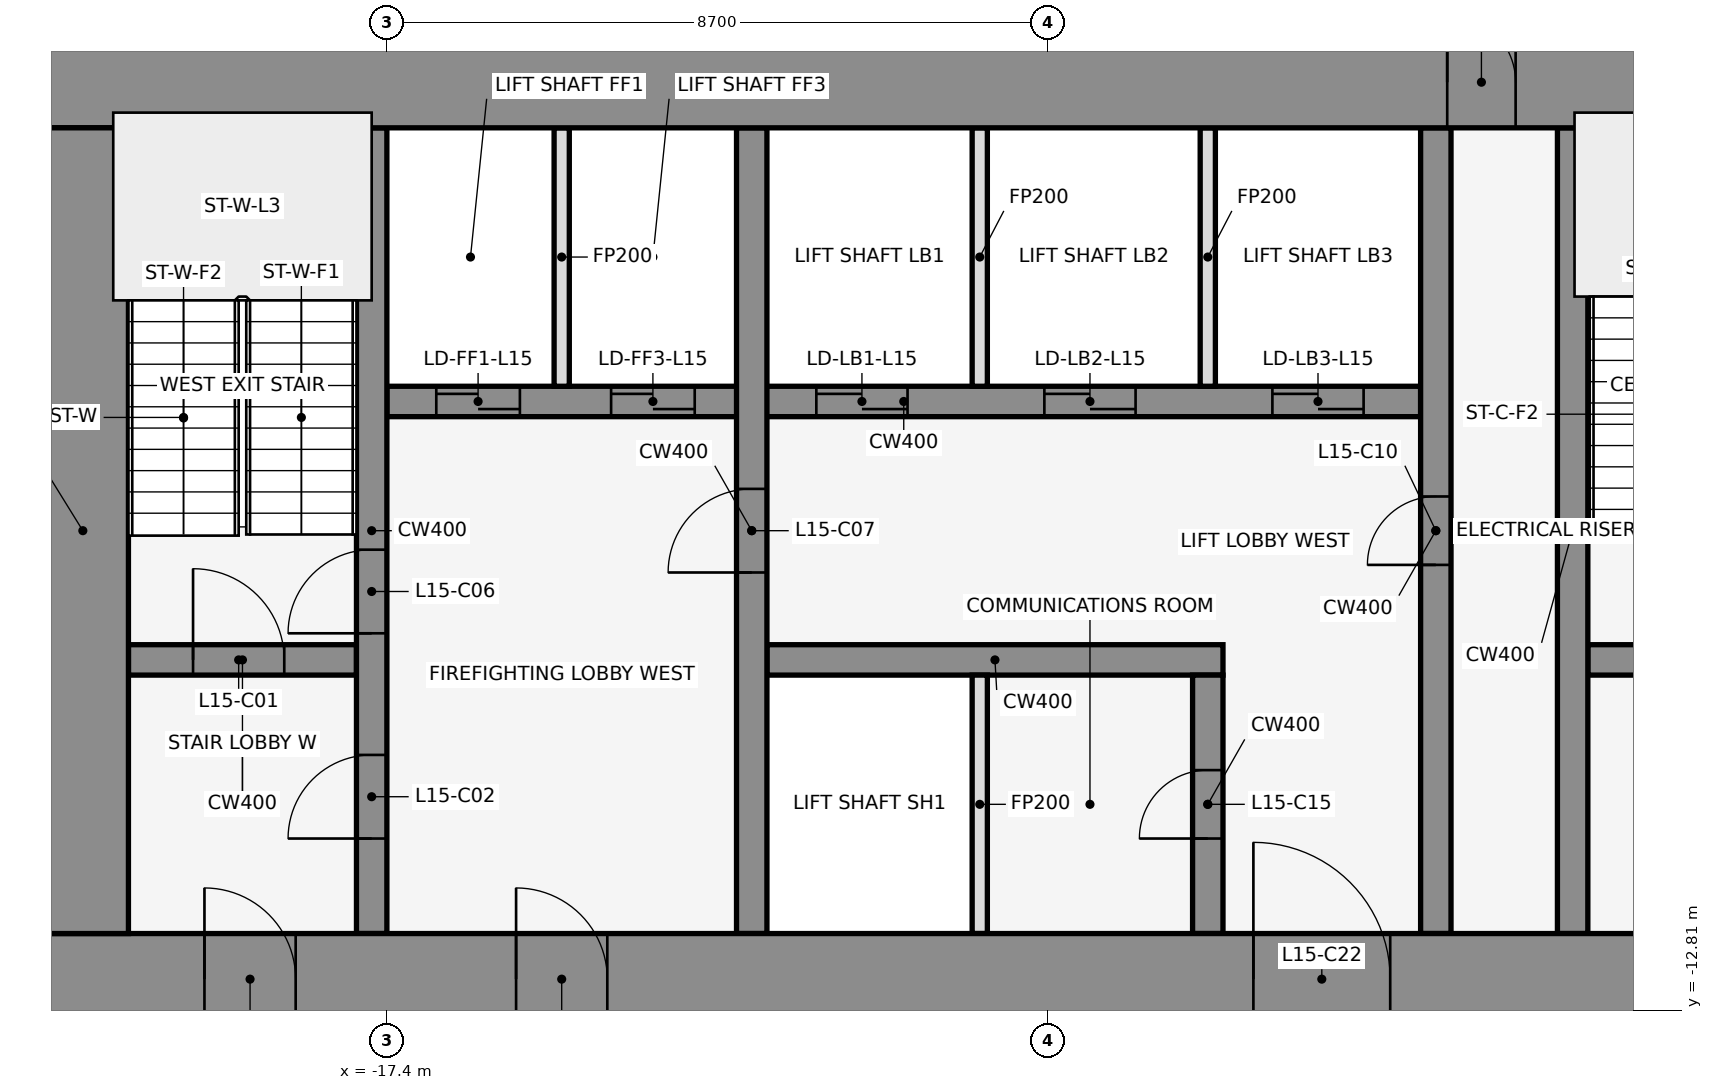
"""IFC4 building model, lengths in metres.
Left out: names, types, materials, properties, quantities, classifications, styles, units other than length and angle.
Written with IfcOpenShell. Run it as: python <this file> out.ifc"""

import sys

from ifc_helpers import new_model, si_unit, direction, frame, frame_2d, origin, place, context, subcontext, project, spatial, rectangle, extrude, element, fill, save


model = new_model("IFC4")
c1 = context("Model", 3, precision=1e-05, world=origin(), true_north=direction((0.0, 1.0)))
c2 = subcontext(c1, "Body", "Model", "MODEL_VIEW")
j1 = project(units=[si_unit("LENGTHUNIT", "METRE"), si_unit("PLANEANGLEUNIT", "RADIAN")], contexts=[c1])
p1 = place(None, origin())
s1 = spatial("IfcSite", under=j1, at=p1, CompositionType="ELEMENT")
p2 = place(p1, origin())
s2 = spatial("IfcBuilding", under=s1, at=p2, CompositionType="ELEMENT")
p3 = place(p2, frame((0.0, 0.0, 75.5)))
s3 = spatial("IfcBuildingStorey", under=s2, at=p3, CompositionType="ELEMENT", Elevation=75.5)
for number, where, z_axis, x_axis in (
    (1, (-0.068, -0.105, 0.0), (0.0, 0.0, 1.0), (-0.84, 0.543, 0.0)),
    (2, (-14.599, 1.08, 0.0), (0.0, 0.0, 1.0), (-0.84, -0.543, 0.0)),
):
    element("IfcWall", number, at=place(p3, frame(where, z_axis=z_axis, x_axis=x_axis)), inside=s3, PredefinedType="STANDARD", context=c2, shape_type="SweptSolid", body=[
        extrude(rectangle(XDim=2.183, YDim=0.25, at=frame_2d((1.091, 0.0))), origin(), (0.0, 0.0, 1.0), 4.35),
    ])
p4 = place(p3, frame((-20.8, -8.2, 0.0), z_axis=(0.0, 0.0, 1.0), x_axis=(1.0, 0.0, 0.0)))
e3 = element("IfcWall", 3, at=p4, inside=s3, PredefinedType="SHEAR", context=c2, shape_type="SweptSolid", body=[
    extrude(rectangle(XDim=3.0, YDim=0.4, at=frame_2d((1.5, 0.0))), origin(), (0.0, 0.0, 1.0), 4.5),
])
p5 = place(p4, frame((0.85, 0.0, 0.0)))
e4 = element("IfcOpeningElement", 4, at=p5, cuts=e3, PredefinedType="OPENING", context=c2, shape_type="SweptSolid", body=[
    extrude(rectangle(XDim=1.2, YDim=2.1, at=frame_2d((0.6, 1.05))), frame((0.0, 0.212, 0.0), z_axis=(0.0, -1.0, 0.0), x_axis=(1.0, 0.0, 0.0)), (0.0, 0.0, 1.0), 0.424),
])
p6 = place(p3, frame((-12.4, -8.2, 0.0), z_axis=(0.0, 0.0, 1.0), x_axis=(1.0, 0.0, 0.0)))
e5 = element("IfcWall", 5, at=p6, inside=s3, PredefinedType="SHEAR", context=c2, shape_type="SweptSolid", body=[
    extrude(rectangle(XDim=6.0, YDim=0.4, at=frame_2d((3.0, 0.0))), origin(), (0.0, 0.0, 1.0), 4.5),
])
p7 = place(p3, frame((-1.6, -8.2, 0.0), z_axis=(0.0, 0.0, 1.0), x_axis=(1.0, 0.0, 0.0)))
e6 = element("IfcWall", 6, at=p7, inside=s3, PredefinedType="SHEAR", context=c2, shape_type="SweptSolid", body=[
    extrude(rectangle(XDim=3.2, YDim=0.4, at=frame_2d((1.6, 0.0))), origin(), (0.0, 0.0, 1.0), 4.5),
])
p8 = place(p7, frame((1.05, 0.0, 0.0)))
e7 = element("IfcOpeningElement", 7, at=p8, cuts=e6, PredefinedType="OPENING", context=c2, shape_type="SweptSolid", body=[
    extrude(rectangle(XDim=1.2, YDim=2.1, at=frame_2d((0.6, 1.05))), frame((0.0, 0.212, 0.0), z_axis=(0.0, -1.0, 0.0), x_axis=(1.0, 0.0, 0.0)), (0.0, 0.0, 1.0), 0.424),
])
p9 = place(p3, frame((-17.4, -4.8, 0.0), z_axis=(0.0, 0.0, 1.0), x_axis=(1.0, 0.0, 0.0)))
e8 = element("IfcWall", 8, at=p9, inside=s3, PredefinedType="SHEAR", context=c2, shape_type="SweptSolid", body=[
    extrude(rectangle(XDim=13.6, YDim=0.4, at=frame_2d((6.8, 0.0))), origin(), (0.0, 0.0, 1.0), 4.5),
])
p10 = place(p9, frame((0.65, 0.0, 0.0)))
e9 = element("IfcOpeningElement", 9, at=p10, cuts=e8, PredefinedType="OPENING", context=c2, shape_type="SweptSolid", body=[
    extrude(rectangle(XDim=1.1, YDim=2.1, at=frame_2d((0.55, 1.05))), frame((0.0, 0.212, 0.0), z_axis=(0.0, -1.0, 0.0), x_axis=(1.0, 0.0, 0.0)), (0.0, 0.0, 1.0), 0.424),
])
p11 = place(p9, frame((2.95, 0.0, 0.0)))
e10 = element("IfcOpeningElement", 10, at=p11, cuts=e8, PredefinedType="OPENING", context=c2, shape_type="SweptSolid", body=[
    extrude(rectangle(XDim=1.1, YDim=2.1, at=frame_2d((0.55, 1.05))), frame((0.0, 0.212, 0.0), z_axis=(0.0, -1.0, 0.0), x_axis=(1.0, 0.0, 0.0)), (0.0, 0.0, 1.0), 0.424),
])
p12 = place(p9, frame((5.65, 0.0, 0.0)))
e11 = element("IfcOpeningElement", 11, at=p12, cuts=e8, PredefinedType="OPENING", context=c2, shape_type="SweptSolid", body=[
    extrude(rectangle(XDim=1.2, YDim=2.1, at=frame_2d((0.6, 1.05))), frame((0.0, 0.212, 0.0), z_axis=(0.0, -1.0, 0.0), x_axis=(1.0, 0.0, 0.0)), (0.0, 0.0, 1.0), 0.424),
])
p13 = place(p9, frame((8.65, 0.0, 0.0)))
e12 = element("IfcOpeningElement", 12, at=p13, cuts=e8, PredefinedType="OPENING", context=c2, shape_type="SweptSolid", body=[
    extrude(rectangle(XDim=1.2, YDim=2.1, at=frame_2d((0.6, 1.05))), frame((0.0, 0.212, 0.0), z_axis=(0.0, -1.0, 0.0), x_axis=(1.0, 0.0, 0.0)), (0.0, 0.0, 1.0), 0.424),
])
p14 = place(p9, frame((11.65, 0.0, 0.0)))
e13 = element("IfcOpeningElement", 13, at=p14, cuts=e8, PredefinedType="OPENING", context=c2, shape_type="SweptSolid", body=[
    extrude(rectangle(XDim=1.2, YDim=2.1, at=frame_2d((0.6, 1.05))), frame((0.0, 0.212, 0.0), z_axis=(0.0, -1.0, 0.0), x_axis=(1.0, 0.0, 0.0)), (0.0, 0.0, 1.0), 0.424),
])
p15 = place(p3, frame((-17.6, -11.8, 0.0), z_axis=(0.0, 0.0, 1.0), x_axis=(0.0, 1.0, 0.0)))
e14 = element("IfcWall", 14, at=p15, inside=s3, PredefinedType="SHEAR", context=c2, shape_type="SweptSolid", body=[
    extrude(rectangle(XDim=10.6, YDim=0.4, at=frame_2d((5.3, 0.0))), origin(), (0.0, 0.0, 1.0), 4.5),
])
p16 = place(p15, frame((1.25, 0.0, 0.0)))
e15 = element("IfcOpeningElement", 15, at=p16, cuts=e14, PredefinedType="OPENING", context=c2, shape_type="SweptSolid", body=[
    extrude(rectangle(XDim=1.1, YDim=2.1, at=frame_2d((0.55, 1.05))), frame((0.0, 0.212, 0.0), z_axis=(0.0, -1.0, 0.0), x_axis=(1.0, 0.0, 0.0)), (0.0, 0.0, 1.0), 0.424),
])
p17 = place(p15, frame((3.95, 0.0, 0.0)))
e16 = element("IfcOpeningElement", 16, at=p17, cuts=e14, PredefinedType="OPENING", context=c2, shape_type="SweptSolid", body=[
    extrude(rectangle(XDim=1.1, YDim=2.1, at=frame_2d((0.55, 1.05))), frame((0.0, 0.212, 0.0), z_axis=(0.0, -1.0, 0.0), x_axis=(1.0, 0.0, 0.0)), (0.0, 0.0, 1.0), 0.424),
])
p18 = place(p3, frame((-15.1, -4.6, 0.0), z_axis=(0.0, 0.0, 1.0), x_axis=(0.0, 1.0, 0.0)))
e17 = element("IfcWall", 17, at=p18, inside=s3, PredefinedType="PARTITIONING", context=c2, shape_type="SweptSolid", body=[
    extrude(rectangle(XDim=3.4, YDim=0.2, at=frame_2d((1.7, 0.0))), origin(), (0.0, 0.0, 1.0), 3.339),
])
p19 = place(p3, frame((-12.6, -11.8, 0.0), z_axis=(0.0, 0.0, 1.0), x_axis=(0.0, 1.0, 0.0)))
e18 = element("IfcWall", 18, at=p19, inside=s3, PredefinedType="SHEAR", context=c2, shape_type="SweptSolid", body=[
    extrude(rectangle(XDim=10.6, YDim=0.4, at=frame_2d((5.3, 0.0))), origin(), (0.0, 0.0, 1.0), 4.5),
])
p20 = place(p19, frame((4.75, 0.0, 0.0)))
e19 = element("IfcOpeningElement", 19, at=p20, cuts=e18, PredefinedType="OPENING", context=c2, shape_type="SweptSolid", body=[
    extrude(rectangle(XDim=1.1, YDim=2.1, at=frame_2d((0.55, 1.05))), frame((0.0, 0.212, 0.0), z_axis=(0.0, -1.0, 0.0), x_axis=(1.0, 0.0, 0.0)), (0.0, 0.0, 1.0), 0.424),
])
for number, where, z_axis, x_axis in (
    (20, (-9.6, -11.8, 0.0), (0.0, 0.0, 1.0), (0.0, 1.0, 0.0)),
    (21, (-9.6, -4.6, 0.0), (0.0, 0.0, 1.0), (0.0, 1.0, 0.0)),
):
    element("IfcWall", number, at=place(p3, frame(where, z_axis=z_axis, x_axis=x_axis)), inside=s3, PredefinedType="PARTITIONING", context=c2, shape_type="SweptSolid", body=[
        extrude(rectangle(XDim=3.4, YDim=0.2, at=frame_2d((1.7, 0.0))), origin(), (0.0, 0.0, 1.0), 3.339),
    ])
p21 = place(p3, frame((-6.6, -11.8, 0.0), z_axis=(0.0, 0.0, 1.0), x_axis=(0.0, 1.0, 0.0)))
e22 = element("IfcWall", 22, at=p21, inside=s3, PredefinedType="SHEAR", context=c2, shape_type="SweptSolid", body=[
    extrude(rectangle(XDim=3.4, YDim=0.4, at=frame_2d((1.7, 0.0))), origin(), (0.0, 0.0, 1.0), 4.5),
])
p22 = place(p21, frame((1.25, 0.0, 0.0)))
e23 = element("IfcOpeningElement", 23, at=p22, cuts=e22, PredefinedType="OPENING", context=c2, shape_type="SweptSolid", body=[
    extrude(rectangle(XDim=0.9, YDim=2.1, at=frame_2d((0.45, 1.05))), frame((0.0, 0.212, 0.0), z_axis=(0.0, -1.0, 0.0), x_axis=(1.0, 0.0, 0.0)), (0.0, 0.0, 1.0), 0.424),
])
p23 = place(p3, frame((-6.6, -4.6, 0.0), z_axis=(0.0, 0.0, 1.0), x_axis=(0.0, 1.0, 0.0)))
e24 = element("IfcWall", 24, at=p23, inside=s3, PredefinedType="PARTITIONING", context=c2, shape_type="SweptSolid", body=[
    extrude(rectangle(XDim=3.4, YDim=0.2, at=frame_2d((1.7, 0.0))), origin(), (0.0, 0.0, 1.0), 3.339),
])
p24 = place(p3, frame((-3.6, -11.8, 0.0), z_axis=(0.0, 0.0, 1.0), x_axis=(0.0, 1.0, 0.0)))
e25 = element("IfcWall", 25, at=p24, inside=s3, PredefinedType="SHEAR", context=c2, shape_type="SweptSolid", body=[
    extrude(rectangle(XDim=10.6, YDim=0.4, at=frame_2d((5.3, 0.0))), origin(), (0.0, 0.0, 1.0), 4.5),
])
p25 = place(p24, frame((4.85, 0.0, 0.0)))
e26 = element("IfcOpeningElement", 26, at=p25, cuts=e25, PredefinedType="OPENING", context=c2, shape_type="SweptSolid", body=[
    extrude(rectangle(XDim=0.9, YDim=2.1, at=frame_2d((0.45, 1.05))), frame((0.0, 0.212, 0.0), z_axis=(0.0, -1.0, 0.0), x_axis=(1.0, 0.0, 0.0)), (0.0, 0.0, 1.0), 0.424),
])
p26 = place(p3, frame((-1.8, -11.8, 0.0), z_axis=(0.0, 0.0, 1.0), x_axis=(0.0, 1.0, 0.0)))
e27 = element("IfcWall", 27, at=p26, inside=s3, PredefinedType="SHEAR", context=c2, shape_type="SweptSolid", body=[
    extrude(rectangle(XDim=10.6, YDim=0.4, at=frame_2d((5.3, 0.0))), origin(), (0.0, 0.0, 1.0), 4.5),
])
p27 = place(p3, frame((-22.0, -0.6, 0.0), z_axis=(0.0, 0.0, 1.0), x_axis=(1.0, 0.0, 0.0)))
e28 = element("IfcWall", 28, at=p27, inside=s3, PredefinedType="SHEAR", context=c2, shape_type="SweptSolid", body=[
    extrude(rectangle(XDim=44.0, YDim=1.2, at=frame_2d((22.0, 0.0))), origin(), (0.0, 0.0, 1.0), 4.5),
])
p28 = place(p27, frame((18.55, 0.0, 0.0)))
e29 = element("IfcOpeningElement", 29, at=p28, cuts=e28, PredefinedType="OPENING", context=c2, shape_type="SweptSolid", body=[
    extrude(rectangle(XDim=0.9, YDim=2.1, at=frame_2d((0.45, 1.05))), frame((0.0, 0.612, 0.0), z_axis=(0.0, -1.0, 0.0), x_axis=(1.0, 0.0, 0.0)), (0.0, 0.0, 1.0), 1.224),
])
p29 = place(p27, frame((24.55, 0.0, 0.0)))
e30 = element("IfcOpeningElement", 30, at=p29, cuts=e28, PredefinedType="OPENING", context=c2, shape_type="SweptSolid", body=[
    extrude(rectangle(XDim=0.9, YDim=2.1, at=frame_2d((0.45, 1.05))), frame((0.0, 0.612, 0.0), z_axis=(0.0, -1.0, 0.0), x_axis=(1.0, 0.0, 0.0)), (0.0, 0.0, 1.0), 1.224),
])
p30 = place(p3, frame((-22.0, -12.4, 0.0), z_axis=(0.0, 0.0, 1.0), x_axis=(1.0, 0.0, 0.0)))
e31 = element("IfcWall", 31, at=p30, inside=s3, PredefinedType="SHEAR", context=c2, shape_type="SweptSolid", body=[
    extrude(rectangle(XDim=44.0, YDim=1.2, at=frame_2d((22.0, 0.0))), origin(), (0.0, 0.0, 1.0), 4.5),
])
p31 = place(p30, frame((2.2, 0.0, 0.0)))
e32 = element("IfcOpeningElement", 32, at=p31, cuts=e31, PredefinedType="OPENING", context=c2, shape_type="SweptSolid", body=[
    extrude(rectangle(XDim=1.2, YDim=2.1, at=frame_2d((0.6, 1.05))), frame((0.0, 0.612, 0.0), z_axis=(0.0, -1.0, 0.0), x_axis=(1.0, 0.0, 0.0)), (0.0, 0.0, 1.0), 1.224),
])
p32 = place(p30, frame((21.4, 0.0, 0.0)))
e33 = element("IfcOpeningElement", 33, at=p32, cuts=e31, PredefinedType="OPENING", context=c2, shape_type="SweptSolid", body=[
    extrude(rectangle(XDim=1.2, YDim=2.1, at=frame_2d((0.6, 1.05))), frame((0.0, 0.612, 0.0), z_axis=(0.0, -1.0, 0.0), x_axis=(1.0, 0.0, 0.0)), (0.0, 0.0, 1.0), 1.224),
])
p33 = place(p30, frame((40.6, 0.0, 0.0)))
e34 = element("IfcOpeningElement", 34, at=p33, cuts=e31, PredefinedType="OPENING", context=c2, shape_type="SweptSolid", body=[
    extrude(rectangle(XDim=1.2, YDim=2.1, at=frame_2d((0.6, 1.05))), frame((0.0, 0.612, 0.0), z_axis=(0.0, -1.0, 0.0), x_axis=(1.0, 0.0, 0.0)), (0.0, 0.0, 1.0), 1.224),
])
p34 = place(p30, frame((16.0, 0.0, 0.0)))
e35 = element("IfcOpeningElement", 35, at=p34, cuts=e31, PredefinedType="OPENING", context=c2, shape_type="SweptSolid", body=[
    extrude(rectangle(XDim=1.8, YDim=2.1, at=frame_2d((0.9, 1.05))), frame((0.0, 0.612, 0.0), z_axis=(0.0, -1.0, 0.0), x_axis=(1.0, 0.0, 0.0)), (0.0, 0.0, 1.0), 1.224),
])
p35 = place(p30, frame((6.3, 0.0, 0.0)))
e36 = element("IfcOpeningElement", 36, at=p35, cuts=e31, PredefinedType="OPENING", context=c2, shape_type="SweptSolid", body=[
    extrude(rectangle(XDim=1.2, YDim=2.1, at=frame_2d((0.6, 1.05))), frame((0.0, 0.612, 0.0), z_axis=(0.0, -1.0, 0.0), x_axis=(1.0, 0.0, 0.0)), (0.0, 0.0, 1.0), 1.224),
])
p36 = place(p30, frame((26.2, 0.0, 0.0)))
e37 = element("IfcOpeningElement", 37, at=p36, cuts=e31, PredefinedType="OPENING", context=c2, shape_type="SweptSolid", body=[
    extrude(rectangle(XDim=1.8, YDim=2.1, at=frame_2d((0.9, 1.05))), frame((0.0, 0.612, 0.0), z_axis=(0.0, -1.0, 0.0), x_axis=(1.0, 0.0, 0.0)), (0.0, 0.0, 1.0), 1.224),
])
p37 = place(p30, frame((36.5, 0.0, 0.0)))
e38 = element("IfcOpeningElement", 38, at=p37, cuts=e31, PredefinedType="OPENING", context=c2, shape_type="SweptSolid", body=[
    extrude(rectangle(XDim=1.2, YDim=2.1, at=frame_2d((0.6, 1.05))), frame((0.0, 0.612, 0.0), z_axis=(0.0, -1.0, 0.0), x_axis=(1.0, 0.0, 0.0)), (0.0, 0.0, 1.0), 1.224),
])
p38 = place(p3, frame((-21.4, -11.8, 0.0), z_axis=(0.0, 0.0, 1.0), x_axis=(0.0, 1.0, 0.0)))
e39 = element("IfcWall", 39, at=p38, inside=s3, PredefinedType="SHEAR", context=c2, shape_type="SweptSolid", body=[
    extrude(rectangle(XDim=10.6, YDim=1.2, at=frame_2d((5.3, 0.0))), origin(), (0.0, 0.0, 1.0), 4.5),
])
p39 = place(p5, origin())
e40 = element("IfcDoor", 40, at=p39, inside=s3, OperationType="SINGLE_SWING_LEFT", PredefinedType="DOOR", context=c2, shape_type="SweptSolid", body=[
    extrude(rectangle(XDim=1.2, YDim=2.1, at=frame_2d((0.6, 1.05))), frame((0.0, 0.025, 0.0), z_axis=(0.0, -1.0, 0.0), x_axis=(1.0, 0.0, 0.0)), (0.0, 0.0, 1.0), 0.05),
])
fill(e4, e40)
p40 = place(p16, frame((1.1, 0.0, 0.0), z_axis=(0.0, 0.0, 1.0), x_axis=(-1.0, 0.0, 0.0)))
e41 = element("IfcDoor", 41, at=p40, inside=s3, OperationType="SINGLE_SWING_LEFT", PredefinedType="DOOR", context=c2, shape_type="SweptSolid", body=[
    extrude(rectangle(XDim=1.1, YDim=2.1, at=frame_2d((0.55, 1.05))), frame((0.0, 0.025, 0.0), z_axis=(0.0, -1.0, 0.0), x_axis=(1.0, 0.0, 0.0)), (0.0, 0.0, 1.0), 0.05),
])
fill(e15, e41)
p41 = place(p10, origin())
e42 = element("IfcDoor", 42, at=p41, inside=s3, OperationType="DOUBLE_DOOR_SLIDING", PredefinedType="DOOR", context=c2, shape_type="SweptSolid", body=[
    extrude(rectangle(XDim=1.1, YDim=2.1, at=frame_2d((0.55, 1.05))), frame((0.0, 0.025, 0.0), z_axis=(0.0, -1.0, 0.0), x_axis=(1.0, 0.0, 0.0)), (0.0, 0.0, 1.0), 0.05),
])
fill(e9, e42)
p42 = place(p11, origin())
e43 = element("IfcDoor", 43, at=p42, inside=s3, OperationType="DOUBLE_DOOR_SLIDING", PredefinedType="DOOR", context=c2, shape_type="SweptSolid", body=[
    extrude(rectangle(XDim=1.1, YDim=2.1, at=frame_2d((0.55, 1.05))), frame((0.0, 0.025, 0.0), z_axis=(0.0, -1.0, 0.0), x_axis=(1.0, 0.0, 0.0)), (0.0, 0.0, 1.0), 0.05),
])
fill(e10, e43)
p43 = place(p12, origin())
e44 = element("IfcDoor", 44, at=p43, inside=s3, OperationType="DOUBLE_DOOR_SLIDING", PredefinedType="DOOR", context=c2, shape_type="SweptSolid", body=[
    extrude(rectangle(XDim=1.2, YDim=2.1, at=frame_2d((0.6, 1.05))), frame((0.0, 0.025, 0.0), z_axis=(0.0, -1.0, 0.0), x_axis=(1.0, 0.0, 0.0)), (0.0, 0.0, 1.0), 0.05),
])
fill(e11, e44)
p44 = place(p13, origin())
e45 = element("IfcDoor", 45, at=p44, inside=s3, OperationType="DOUBLE_DOOR_SLIDING", PredefinedType="DOOR", context=c2, shape_type="SweptSolid", body=[
    extrude(rectangle(XDim=1.2, YDim=2.1, at=frame_2d((0.6, 1.05))), frame((0.0, 0.025, 0.0), z_axis=(0.0, -1.0, 0.0), x_axis=(1.0, 0.0, 0.0)), (0.0, 0.0, 1.0), 0.05),
])
fill(e12, e45)
p45 = place(p14, origin())
e46 = element("IfcDoor", 46, at=p45, inside=s3, OperationType="DOUBLE_DOOR_SLIDING", PredefinedType="DOOR", context=c2, shape_type="SweptSolid", body=[
    extrude(rectangle(XDim=1.2, YDim=2.1, at=frame_2d((0.6, 1.05))), frame((0.0, 0.025, 0.0), z_axis=(0.0, -1.0, 0.0), x_axis=(1.0, 0.0, 0.0)), (0.0, 0.0, 1.0), 0.05),
])
fill(e13, e46)
p46 = place(p17, frame((1.1, 0.0, 0.0), z_axis=(0.0, 0.0, 1.0), x_axis=(-1.0, 0.0, 0.0)))
e47 = element("IfcDoor", 47, at=p46, inside=s3, OperationType="SINGLE_SWING_LEFT", PredefinedType="DOOR", context=c2, shape_type="SweptSolid", body=[
    extrude(rectangle(XDim=1.1, YDim=2.1, at=frame_2d((0.55, 1.05))), frame((0.0, 0.025, 0.0), z_axis=(0.0, -1.0, 0.0), x_axis=(1.0, 0.0, 0.0)), (0.0, 0.0, 1.0), 0.05),
])
fill(e16, e47)
p47 = place(p20, origin())
e48 = element("IfcDoor", 48, at=p47, inside=s3, OperationType="SINGLE_SWING_LEFT", PredefinedType="DOOR", context=c2, shape_type="SweptSolid", body=[
    extrude(rectangle(XDim=1.1, YDim=2.1, at=frame_2d((0.55, 1.05))), frame((0.0, 0.025, 0.0), z_axis=(0.0, -1.0, 0.0), x_axis=(1.0, 0.0, 0.0)), (0.0, 0.0, 1.0), 0.05),
])
fill(e19, e48)
p48 = place(p25, frame((0.9, 0.0, 0.0), z_axis=(0.0, 0.0, 1.0), x_axis=(-1.0, 0.0, 0.0)))
e49 = element("IfcDoor", 49, at=p48, inside=s3, OperationType="SINGLE_SWING_LEFT", PredefinedType="DOOR", context=c2, shape_type="SweptSolid", body=[
    extrude(rectangle(XDim=0.9, YDim=2.1, at=frame_2d((0.45, 1.05))), frame((0.0, 0.025, 0.0), z_axis=(0.0, -1.0, 0.0), x_axis=(1.0, 0.0, 0.0)), (0.0, 0.0, 1.0), 0.05),
])
fill(e26, e49)
p49 = place(p22, origin())
e50 = element("IfcDoor", 50, at=p49, inside=s3, OperationType="SINGLE_SWING_LEFT", PredefinedType="DOOR", context=c2, shape_type="SweptSolid", body=[
    extrude(rectangle(XDim=0.9, YDim=2.1, at=frame_2d((0.45, 1.05))), frame((0.0, 0.025, 0.0), z_axis=(0.0, -1.0, 0.0), x_axis=(1.0, 0.0, 0.0)), (0.0, 0.0, 1.0), 0.05),
])
fill(e23, e50)
p50 = place(p28, origin())
e51 = element("IfcDoor", 51, at=p50, inside=s3, OperationType="SINGLE_SWING_LEFT", PredefinedType="DOOR", context=c2, shape_type="SweptSolid", body=[
    extrude(rectangle(XDim=0.9, YDim=2.1, at=frame_2d((0.45, 1.05))), frame((0.0, 0.025, 0.0), z_axis=(0.0, -1.0, 0.0), x_axis=(1.0, 0.0, 0.0)), (0.0, 0.0, 1.0), 0.05),
])
fill(e29, e51)
p51 = place(p31, frame((1.2, 0.0, 0.0), z_axis=(0.0, 0.0, 1.0), x_axis=(-1.0, 0.0, 0.0)))
e52 = element("IfcDoor", 52, at=p51, inside=s3, OperationType="SINGLE_SWING_RIGHT", PredefinedType="DOOR", context=c2, shape_type="SweptSolid", body=[
    extrude(rectangle(XDim=1.2, YDim=2.1, at=frame_2d((0.6, 1.05))), frame((0.0, 0.025, 0.0), z_axis=(0.0, -1.0, 0.0), x_axis=(1.0, 0.0, 0.0)), (0.0, 0.0, 1.0), 0.05),
])
fill(e32, e52)
p52 = place(p34, origin())
e53 = element("IfcDoor", 53, at=p52, inside=s3, OperationType="SINGLE_SWING_LEFT", PredefinedType="DOOR", context=c2, shape_type="SweptSolid", body=[
    extrude(rectangle(XDim=1.8, YDim=2.1, at=frame_2d((0.9, 1.05))), frame((0.0, 0.025, 0.0), z_axis=(0.0, -1.0, 0.0), x_axis=(1.0, 0.0, 0.0)), (0.0, 0.0, 1.0), 0.05),
])
fill(e35, e53)
p53 = place(p35, frame((1.2, 0.0, 0.0), z_axis=(0.0, 0.0, 1.0), x_axis=(-1.0, 0.0, 0.0)))
e54 = element("IfcDoor", 54, at=p53, inside=s3, OperationType="SINGLE_SWING_RIGHT", PredefinedType="DOOR", context=c2, shape_type="SweptSolid", body=[
    extrude(rectangle(XDim=1.2, YDim=2.1, at=frame_2d((0.6, 1.05))), frame((0.0, 0.025, 0.0), z_axis=(0.0, -1.0, 0.0), x_axis=(1.0, 0.0, 0.0)), (0.0, 0.0, 1.0), 0.05),
])
fill(e36, e54)
save(model, sys.argv[1])
